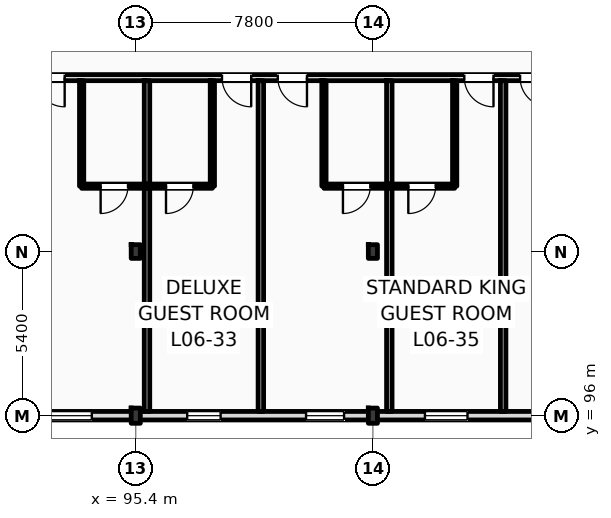
"""IFC4 building model, lengths in metres.
Left out: names, types, materials, properties, quantities, classifications, styles, units other than length and angle.
Written with IfcOpenShell. Run it as: python <this file> out.ifc"""

import sys

from ifc_helpers import new_model, si_unit, direction, frame, frame_2d, origin, origin_2d, place, context, subcontext, project, spatial, rectangle, i_section, extrude, element, fill, save


model = new_model("IFC4")
c1 = context("Model", 3, precision=1e-05, world=origin(), true_north=direction((0.0, 1.0)))
c2 = subcontext(c1, "Body", "Model", "MODEL_VIEW")
j1 = project(units=[si_unit("LENGTHUNIT", "METRE"), si_unit("PLANEANGLEUNIT", "RADIAN")], contexts=[c1])
p1 = place(None, origin())
s1 = spatial("IfcSite", under=j1, at=p1, CompositionType="ELEMENT")
p2 = place(p1, origin())
s2 = spatial("IfcBuilding", under=s1, at=p2, CompositionType="ELEMENT")
p3 = place(p2, frame((0.0, 0.0, 28.2)))
s3 = spatial("IfcBuildingStorey", under=s2, at=p3, CompositionType="ELEMENT", Elevation=28.2)
p4 = place(p3, frame((95.4, 96.0, 0.0), z_axis=(0.0, 0.0, 1.0), x_axis=(1.0, 0.0, 0.0)))
e1 = element("IfcColumn", 1, at=p4, inside=s3, PredefinedType="COLUMN", context=c2, shape_type="SweptSolid", body=[
    extrude(i_section(OverallWidth=0.3, OverallDepth=0.5, WebThickness=0.014, FlangeThickness=0.028, FilletRadius=0.027, at=origin_2d()), origin(), (0.0, 0.0, 1.0), 3.6),
])
p5 = place(p3, frame((95.4, 101.4, 0.0), z_axis=(0.0, 0.0, 1.0), x_axis=(1.0, 0.0, 0.0)))
e2 = element("IfcColumn", 2, at=p5, inside=s3, PredefinedType="COLUMN", context=c2, shape_type="SweptSolid", body=[
    extrude(i_section(OverallWidth=0.3, OverallDepth=0.45, WebThickness=0.014, FlangeThickness=0.026, FilletRadius=0.027, at=origin_2d()), origin(), (0.0, 0.0, 1.0), 3.6),
])
p6 = place(p3, frame((103.2, 96.0, 0.0), z_axis=(0.0, 0.0, 1.0), x_axis=(1.0, 0.0, 0.0)))
e3 = element("IfcColumn", 3, at=p6, inside=s3, PredefinedType="COLUMN", context=c2, shape_type="SweptSolid", body=[
    extrude(i_section(OverallWidth=0.3, OverallDepth=0.5, WebThickness=0.014, FlangeThickness=0.028, FilletRadius=0.027, at=origin_2d()), origin(), (0.0, 0.0, 1.0), 3.6),
])
p7 = place(p3, frame((103.2, 101.4, 0.0), z_axis=(0.0, 0.0, 1.0), x_axis=(1.0, 0.0, 0.0)))
e4 = element("IfcColumn", 4, at=p7, inside=s3, PredefinedType="COLUMN", context=c2, shape_type="SweptSolid", body=[
    extrude(i_section(OverallWidth=0.3, OverallDepth=0.45, WebThickness=0.014, FlangeThickness=0.026, FilletRadius=0.027, at=origin_2d()), origin(), (0.0, 0.0, 1.0), 3.6),
])
p8 = place(p3, frame((25.2, 96.0, 0.0), z_axis=(0.0, 0.0, 1.0), x_axis=(1.0, 0.0, 0.0)))
e5 = element("IfcWall", 5, at=p8, inside=s3, PredefinedType="STANDARD", context=c2, shape_type="SweptSolid", body=[
    extrude(rectangle(XDim=94.8, YDim=0.28, at=frame_2d((47.4, 0.0))), origin(), (0.0, 0.0, 1.0), 2.8),
])
p9 = place(p8, frame((16.454, 0.0, 0.9)))
e6 = element("IfcOpeningElement", 6, at=p9, cuts=e5, PredefinedType="OPENING", context=c2, shape_type="SweptSolid", body=[
    extrude(rectangle(XDim=2.7, YDim=1.72, at=frame_2d((1.35, 0.86))), frame((0.0, 0.15, 0.0), z_axis=(0.0, -1.0, 0.0), x_axis=(1.0, 0.0, 0.0)), (0.0, 0.0, 1.0), 0.3),
])
p10 = place(p8, frame((20.068, 0.0, 0.9)))
e7 = element("IfcOpeningElement", 7, at=p10, cuts=e5, PredefinedType="OPENING", context=c2, shape_type="SweptSolid", body=[
    extrude(rectangle(XDim=2.389, YDim=1.72, at=frame_2d((1.194, 0.86))), frame((0.0, 0.15, 0.0), z_axis=(0.0, -1.0, 0.0), x_axis=(1.0, 0.0, 0.0)), (0.0, 0.0, 1.0), 0.3),
])
p11 = place(p8, frame((24.277, 0.0, 0.9)))
e8 = element("IfcOpeningElement", 8, at=p11, cuts=e5, PredefinedType="OPENING", context=c2, shape_type="SweptSolid", body=[
    extrude(rectangle(XDim=1.8, YDim=1.72, at=frame_2d((0.9, 0.86))), frame((0.0, 0.15, 0.0), z_axis=(0.0, -1.0, 0.0), x_axis=(1.0, 0.0, 0.0)), (0.0, 0.0, 1.0), 0.3),
])
p12 = place(p8, frame((27.885, 0.0, 0.9)))
e9 = element("IfcOpeningElement", 9, at=p12, cuts=e5, PredefinedType="OPENING", context=c2, shape_type="SweptSolid", body=[
    extrude(rectangle(XDim=2.388, YDim=1.72, at=frame_2d((1.194, 0.86))), frame((0.0, 0.15, 0.0), z_axis=(0.0, -1.0, 0.0), x_axis=(1.0, 0.0, 0.0)), (0.0, 0.0, 1.0), 0.3),
])
p13 = place(p8, frame((32.093, 0.0, 0.9)))
e10 = element("IfcOpeningElement", 10, at=p13, cuts=e5, PredefinedType="OPENING", context=c2, shape_type="SweptSolid", body=[
    extrude(rectangle(XDim=1.8, YDim=1.72, at=frame_2d((0.9, 0.86))), frame((0.0, 0.15, 0.0), z_axis=(0.0, -1.0, 0.0), x_axis=(1.0, 0.0, 0.0)), (0.0, 0.0, 1.0), 0.3),
])
p14 = place(p8, frame((35.702, 0.0, 0.9)))
e11 = element("IfcOpeningElement", 11, at=p14, cuts=e5, PredefinedType="OPENING", context=c2, shape_type="SweptSolid", body=[
    extrude(rectangle(XDim=2.488, YDim=1.72, at=frame_2d((1.244, 0.86))), frame((0.0, 0.15, 0.0), z_axis=(0.0, -1.0, 0.0), x_axis=(1.0, 0.0, 0.0)), (0.0, 0.0, 1.0), 0.3),
])
p15 = place(p8, frame((55.56, 0.0, 0.9)))
e12 = element("IfcOpeningElement", 12, at=p15, cuts=e5, PredefinedType="OPENING", context=c2, shape_type="SweptSolid", body=[
    extrude(rectangle(XDim=1.8, YDim=1.72, at=frame_2d((0.9, 0.86))), frame((0.0, 0.15, 0.0), z_axis=(0.0, -1.0, 0.0), x_axis=(1.0, 0.0, 0.0)), (0.0, 0.0, 1.0), 0.3),
])
p16 = place(p8, frame((58.985, 0.0, 0.9)))
e13 = element("IfcOpeningElement", 13, at=p16, cuts=e5, PredefinedType="OPENING", context=c2, shape_type="SweptSolid", body=[
    extrude(rectangle(XDim=1.8, YDim=1.72, at=frame_2d((0.9, 0.86))), frame((0.0, 0.15, 0.0), z_axis=(0.0, -1.0, 0.0), x_axis=(1.0, 0.0, 0.0)), (0.0, 0.0, 1.0), 0.3),
])
p17 = place(p8, frame((63.21, 0.0, 0.9)))
e14 = element("IfcOpeningElement", 14, at=p17, cuts=e5, PredefinedType="OPENING", context=c2, shape_type="SweptSolid", body=[
    extrude(rectangle(XDim=2.525, YDim=1.72, at=frame_2d((1.262, 0.86))), frame((0.0, 0.15, 0.0), z_axis=(0.0, -1.0, 0.0), x_axis=(1.0, 0.0, 0.0)), (0.0, 0.0, 1.0), 0.3),
])
p18 = place(p8, frame((66.955, 0.0, 0.9)))
e15 = element("IfcOpeningElement", 15, at=p18, cuts=e5, PredefinedType="OPENING", context=c2, shape_type="SweptSolid", body=[
    extrude(rectangle(XDim=1.8, YDim=1.72, at=frame_2d((0.9, 0.86))), frame((0.0, 0.15, 0.0), z_axis=(0.0, -1.0, 0.0), x_axis=(1.0, 0.0, 0.0)), (0.0, 0.0, 1.0), 0.3),
])
p19 = place(p8, frame((71.892, 0.0, 0.9)))
e16 = element("IfcOpeningElement", 16, at=p19, cuts=e5, PredefinedType="OPENING", context=c2, shape_type="SweptSolid", body=[
    extrude(rectangle(XDim=1.1, YDim=1.5, at=frame_2d((0.55, 0.75))), frame((0.0, 0.15, 0.0), z_axis=(0.0, -1.0, 0.0), x_axis=(1.0, 0.0, 0.0)), (0.0, 0.0, 1.0), 0.3),
])
p20 = place(p8, frame((75.802, 0.0, 0.9)))
e17 = element("IfcOpeningElement", 17, at=p20, cuts=e5, PredefinedType="OPENING", context=c2, shape_type="SweptSolid", body=[
    extrude(rectangle(XDim=1.25, YDim=1.6, at=frame_2d((0.625, 0.8))), frame((0.0, 0.15, 0.0), z_axis=(0.0, -1.0, 0.0), x_axis=(1.0, 0.0, 0.0)), (0.0, 0.0, 1.0), 0.3),
])
p21 = place(p8, frame((79.712, 0.0, 0.9)))
e18 = element("IfcOpeningElement", 18, at=p21, cuts=e5, PredefinedType="OPENING", context=c2, shape_type="SweptSolid", body=[
    extrude(rectangle(XDim=1.4, YDim=1.7, at=frame_2d((0.7, 0.85))), frame((0.0, 0.15, 0.0), z_axis=(0.0, -1.0, 0.0), x_axis=(1.0, 0.0, 0.0)), (0.0, 0.0, 1.0), 0.3),
])
p22 = place(p8, frame((83.597, 0.0, 0.9)))
e19 = element("IfcOpeningElement", 19, at=p22, cuts=e5, PredefinedType="OPENING", context=c2, shape_type="SweptSolid", body=[
    extrude(rectangle(XDim=1.6, YDim=1.72, at=frame_2d((0.8, 0.86))), frame((0.0, 0.15, 0.0), z_axis=(0.0, -1.0, 0.0), x_axis=(1.0, 0.0, 0.0)), (0.0, 0.0, 1.0), 0.3),
])
p23 = place(p8, frame((87.507, 0.0, 0.9)))
e20 = element("IfcOpeningElement", 20, at=p23, cuts=e5, PredefinedType="OPENING", context=c2, shape_type="SweptSolid", body=[
    extrude(rectangle(XDim=1.75, YDim=1.72, at=frame_2d((0.875, 0.86))), frame((0.0, 0.15, 0.0), z_axis=(0.0, -1.0, 0.0), x_axis=(1.0, 0.0, 0.0)), (0.0, 0.0, 1.0), 0.3),
])
p24 = place(p8, frame((91.328, 0.0, 0.9)))
e21 = element("IfcOpeningElement", 21, at=p24, cuts=e5, PredefinedType="OPENING", context=c2, shape_type="SweptSolid", body=[
    extrude(rectangle(XDim=2.0, YDim=1.72, at=frame_2d((1.0, 0.86))), frame((0.0, 0.15, 0.0), z_axis=(0.0, -1.0, 0.0), x_axis=(1.0, 0.0, 0.0)), (0.0, 0.0, 1.0), 0.3),
])
p25 = place(p3, frame((79.76, 107.12, 0.0), z_axis=(0.0, 0.0, 1.0), x_axis=(1.0, 0.0, 0.0)))
e22 = element("IfcWall", 22, at=p25, inside=s3, PredefinedType="PARTITIONING", context=c2, shape_type="SweptSolid", body=[
    extrude(rectangle(XDim=40.1, YDim=0.2, at=frame_2d((20.05, 0.0))), origin(), (0.0, 0.0, 1.0), 3.36),
])
p26 = place(p25, frame((2.497, 0.0, 0.0)))
e23 = element("IfcOpeningElement", 23, at=p26, cuts=e22, PredefinedType="OPENING", context=c2, shape_type="SweptSolid", body=[
    extrude(rectangle(XDim=0.96, YDim=2.2, at=frame_2d((0.48, 1.1))), frame((0.0, 0.11, 0.0), z_axis=(0.0, -1.0, 0.0), x_axis=(1.0, 0.0, 0.0)), (0.0, 0.0, 1.0), 0.22),
])
p27 = place(p25, frame((4.372, 0.0, 0.0)))
e24 = element("IfcOpeningElement", 24, at=p27, cuts=e22, PredefinedType="OPENING", context=c2, shape_type="SweptSolid", body=[
    extrude(rectangle(XDim=0.96, YDim=2.2, at=frame_2d((0.48, 1.1))), frame((0.0, 0.11, 0.0), z_axis=(0.0, -1.0, 0.0), x_axis=(1.0, 0.0, 0.0)), (0.0, 0.0, 1.0), 0.22),
])
p28 = place(p25, frame((10.507, 0.0, 0.0)))
e25 = element("IfcOpeningElement", 25, at=p28, cuts=e22, PredefinedType="OPENING", context=c2, shape_type="SweptSolid", body=[
    extrude(rectangle(XDim=0.96, YDim=2.2, at=frame_2d((0.48, 1.1))), frame((0.0, 0.11, 0.0), z_axis=(0.0, -1.0, 0.0), x_axis=(1.0, 0.0, 0.0)), (0.0, 0.0, 1.0), 0.22),
])
p29 = place(p25, frame((12.342, 0.0, 0.0)))
e26 = element("IfcOpeningElement", 26, at=p29, cuts=e22, PredefinedType="OPENING", context=c2, shape_type="SweptSolid", body=[
    extrude(rectangle(XDim=0.96, YDim=2.2, at=frame_2d((0.48, 1.1))), frame((0.0, 0.11, 0.0), z_axis=(0.0, -1.0, 0.0), x_axis=(1.0, 0.0, 0.0)), (0.0, 0.0, 1.0), 0.22),
])
p30 = place(p25, frame((18.477, 0.0, 0.0)))
e27 = element("IfcOpeningElement", 27, at=p30, cuts=e22, PredefinedType="OPENING", context=c2, shape_type="SweptSolid", body=[
    extrude(rectangle(XDim=0.96, YDim=2.2, at=frame_2d((0.48, 1.1))), frame((0.0, 0.11, 0.0), z_axis=(0.0, -1.0, 0.0), x_axis=(1.0, 0.0, 0.0)), (0.0, 0.0, 1.0), 0.22),
])
p31 = place(p25, frame((20.312, 0.0, 0.0)))
e28 = element("IfcOpeningElement", 28, at=p31, cuts=e22, PredefinedType="OPENING", context=c2, shape_type="SweptSolid", body=[
    extrude(rectangle(XDim=0.96, YDim=2.2, at=frame_2d((0.48, 1.1))), frame((0.0, 0.11, 0.0), z_axis=(0.0, -1.0, 0.0), x_axis=(1.0, 0.0, 0.0)), (0.0, 0.0, 1.0), 0.22),
])
p32 = place(p25, frame((26.447, 0.0, 0.0)))
e29 = element("IfcOpeningElement", 29, at=p32, cuts=e22, PredefinedType="OPENING", context=c2, shape_type="SweptSolid", body=[
    extrude(rectangle(XDim=0.96, YDim=2.2, at=frame_2d((0.48, 1.1))), frame((0.0, 0.11, 0.0), z_axis=(0.0, -1.0, 0.0), x_axis=(1.0, 0.0, 0.0)), (0.0, 0.0, 1.0), 0.22),
])
p33 = place(p25, frame((28.282, 0.0, 0.0)))
e30 = element("IfcOpeningElement", 30, at=p33, cuts=e22, PredefinedType="OPENING", context=c2, shape_type="SweptSolid", body=[
    extrude(rectangle(XDim=0.96, YDim=2.2, at=frame_2d((0.48, 1.1))), frame((0.0, 0.11, 0.0), z_axis=(0.0, -1.0, 0.0), x_axis=(1.0, 0.0, 0.0)), (0.0, 0.0, 1.0), 0.22),
])
p34 = place(p25, frame((34.417, 0.0, 0.0)))
e31 = element("IfcOpeningElement", 31, at=p34, cuts=e22, PredefinedType="OPENING", context=c2, shape_type="SweptSolid", body=[
    extrude(rectangle(XDim=0.96, YDim=2.2, at=frame_2d((0.48, 1.1))), frame((0.0, 0.11, 0.0), z_axis=(0.0, -1.0, 0.0), x_axis=(1.0, 0.0, 0.0)), (0.0, 0.0, 1.0), 0.22),
])
p35 = place(p25, frame((36.212, 0.0, 0.0)))
e32 = element("IfcOpeningElement", 32, at=p35, cuts=e22, PredefinedType="OPENING", context=c2, shape_type="SweptSolid", body=[
    extrude(rectangle(XDim=0.96, YDim=2.2, at=frame_2d((0.48, 1.1))), frame((0.0, 0.11, 0.0), z_axis=(0.0, -1.0, 0.0), x_axis=(1.0, 0.0, 0.0)), (0.0, 0.0, 1.0), 0.22),
])
p36 = place(p3, frame((95.77, 96.14, 0.0), z_axis=(0.0, 0.0, 1.0), x_axis=(0.0, 1.0, 0.0)))
e33 = element("IfcWall", 33, at=p36, inside=s3, PredefinedType="PARTITIONING", context=c2, shape_type="SweptSolid", body=[
    extrude(rectangle(XDim=10.88, YDim=0.18, at=frame_2d((5.44, 0.0))), origin(), (0.0, 0.0, 1.0), 3.36),
])
p37 = place(p3, frame((93.62, 103.55, 0.0), z_axis=(0.0, 0.0, 1.0), x_axis=(0.0, 1.0, 0.0)))
e34 = element("IfcWall", 34, at=p37, inside=s3, PredefinedType="PARTITIONING", context=c2, shape_type="SweptSolid", body=[
    extrude(rectangle(XDim=3.47, YDim=0.14, at=frame_2d((1.735, 0.0))), origin(), (0.0, 0.0, 1.0), 3.36),
])
p38 = place(p3, frame((93.62, 103.55, 0.0), z_axis=(0.0, 0.0, 1.0), x_axis=(1.0, 0.0, 0.0)))
e35 = element("IfcWall", 35, at=p38, inside=s3, PredefinedType="PARTITIONING", context=c2, shape_type="SweptSolid", body=[
    extrude(rectangle(XDim=2.15, YDim=0.14, at=frame_2d((1.075, 0.0))), origin(), (0.0, 0.0, 1.0), 3.36),
])
p39 = place(p38, frame((0.625, 0.0, 0.0)))
e36 = element("IfcOpeningElement", 36, at=p39, cuts=e35, PredefinedType="OPENING", context=c2, shape_type="SweptSolid", body=[
    extrude(rectangle(XDim=0.9, YDim=2.1, at=frame_2d((0.45, 1.05))), frame((0.0, 0.08, 0.0), z_axis=(0.0, -1.0, 0.0), x_axis=(1.0, 0.0, 0.0)), (0.0, 0.0, 1.0), 0.16),
])
p40 = place(p3, frame((99.515, 96.14, 0.0), z_axis=(0.0, 0.0, 1.0), x_axis=(0.0, 1.0, 0.0)))
e37 = element("IfcWall", 37, at=p40, inside=s3, PredefinedType="PARTITIONING", context=c2, shape_type="SweptSolid", body=[
    extrude(rectangle(XDim=10.88, YDim=0.18, at=frame_2d((5.44, 0.0))), origin(), (0.0, 0.0, 1.0), 3.36),
])
p41 = place(p3, frame((97.92, 103.55, 0.0), z_axis=(0.0, 0.0, 1.0), x_axis=(0.0, 1.0, 0.0)))
e38 = element("IfcWall", 38, at=p41, inside=s3, PredefinedType="PARTITIONING", context=c2, shape_type="SweptSolid", body=[
    extrude(rectangle(XDim=3.47, YDim=0.14, at=frame_2d((1.735, 0.0))), origin(), (0.0, 0.0, 1.0), 3.05),
])
p42 = place(p3, frame((95.77, 103.55, 0.0), z_axis=(0.0, 0.0, 1.0), x_axis=(1.0, 0.0, 0.0)))
e39 = element("IfcWall", 39, at=p42, inside=s3, PredefinedType="PARTITIONING", context=c2, shape_type="SweptSolid", body=[
    extrude(rectangle(XDim=2.15, YDim=0.14, at=frame_2d((1.075, 0.0))), origin(), (0.0, 0.0, 1.0), 3.36),
])
p43 = place(p42, frame((0.625, 0.0, 0.0)))
e40 = element("IfcOpeningElement", 40, at=p43, cuts=e39, PredefinedType="OPENING", context=c2, shape_type="SweptSolid", body=[
    extrude(rectangle(XDim=0.9, YDim=2.1, at=frame_2d((0.45, 1.05))), frame((0.0, 0.08, 0.0), z_axis=(0.0, -1.0, 0.0), x_axis=(1.0, 0.0, 0.0)), (0.0, 0.0, 1.0), 0.16),
])
p44 = place(p3, frame((103.74, 96.14, 0.0), z_axis=(0.0, 0.0, 1.0), x_axis=(0.0, 1.0, 0.0)))
e41 = element("IfcWall", 41, at=p44, inside=s3, PredefinedType="PARTITIONING", context=c2, shape_type="SweptSolid", body=[
    extrude(rectangle(XDim=10.88, YDim=0.18, at=frame_2d((5.44, 0.0))), origin(), (0.0, 0.0, 1.0), 3.36),
])
p45 = place(p3, frame((101.59, 103.55, 0.0), z_axis=(0.0, 0.0, 1.0), x_axis=(0.0, 1.0, 0.0)))
e42 = element("IfcWall", 42, at=p45, inside=s3, PredefinedType="PARTITIONING", context=c2, shape_type="SweptSolid", body=[
    extrude(rectangle(XDim=3.47, YDim=0.14, at=frame_2d((1.735, 0.0))), origin(), (0.0, 0.0, 1.0), 3.36),
])
p46 = place(p3, frame((101.59, 103.55, 0.0), z_axis=(0.0, 0.0, 1.0), x_axis=(1.0, 0.0, 0.0)))
e43 = element("IfcWall", 43, at=p46, inside=s3, PredefinedType="PARTITIONING", context=c2, shape_type="SweptSolid", body=[
    extrude(rectangle(XDim=2.15, YDim=0.14, at=frame_2d((1.075, 0.0))), origin(), (0.0, 0.0, 1.0), 3.36),
])
p47 = place(p46, frame((0.625, 0.0, 0.0)))
e44 = element("IfcOpeningElement", 44, at=p47, cuts=e43, PredefinedType="OPENING", context=c2, shape_type="SweptSolid", body=[
    extrude(rectangle(XDim=0.9, YDim=2.1, at=frame_2d((0.45, 1.05))), frame((0.0, 0.08, 0.0), z_axis=(0.0, -1.0, 0.0), x_axis=(1.0, 0.0, 0.0)), (0.0, 0.0, 1.0), 0.16),
])
p48 = place(p3, frame((107.485, 96.14, 0.0), z_axis=(0.0, 0.0, 1.0), x_axis=(0.0, 1.0, 0.0)))
e45 = element("IfcWall", 45, at=p48, inside=s3, PredefinedType="PARTITIONING", context=c2, shape_type="SweptSolid", body=[
    extrude(rectangle(XDim=10.88, YDim=0.18, at=frame_2d((5.44, 0.0))), origin(), (0.0, 0.0, 1.0), 3.36),
])
p49 = place(p3, frame((105.89, 103.55, 0.0), z_axis=(0.0, 0.0, 1.0), x_axis=(0.0, 1.0, 0.0)))
e46 = element("IfcWall", 46, at=p49, inside=s3, PredefinedType="PARTITIONING", context=c2, shape_type="SweptSolid", body=[
    extrude(rectangle(XDim=3.47, YDim=0.14, at=frame_2d((1.735, 0.0))), origin(), (0.0, 0.0, 1.0), 3.05),
])
p50 = place(p3, frame((103.74, 103.55, 0.0), z_axis=(0.0, 0.0, 1.0), x_axis=(1.0, 0.0, 0.0)))
e47 = element("IfcWall", 47, at=p50, inside=s3, PredefinedType="PARTITIONING", context=c2, shape_type="SweptSolid", body=[
    extrude(rectangle(XDim=2.15, YDim=0.14, at=frame_2d((1.075, 0.0))), origin(), (0.0, 0.0, 1.0), 3.36),
])
p51 = place(p50, frame((0.625, 0.0, 0.0)))
e48 = element("IfcOpeningElement", 48, at=p51, cuts=e47, PredefinedType="OPENING", context=c2, shape_type="SweptSolid", body=[
    extrude(rectangle(XDim=0.9, YDim=2.1, at=frame_2d((0.45, 1.05))), frame((0.0, 0.08, 0.0), z_axis=(0.0, -1.0, 0.0), x_axis=(1.0, 0.0, 0.0)), (0.0, 0.0, 1.0), 0.16),
])
p52 = place(p18, origin())
e49 = element("IfcWindow", 49, at=p52, inside=s3, PartitioningType="DOUBLE_PANEL_VERTICAL", PredefinedType="WINDOW", context=c2, shape_type="SweptSolid", body=[
    extrude(rectangle(XDim=1.8, YDim=1.72, at=frame_2d((0.9, 0.86))), frame((0.0, 0.03, 0.0), z_axis=(0.0, -1.0, 0.0), x_axis=(1.0, 0.0, 0.0)), (0.0, 0.0, 1.0), 0.06),
])
fill(e15, e49)
p53 = place(p19, origin())
e50 = element("IfcWindow", 50, at=p53, inside=s3, PartitioningType="DOUBLE_PANEL_VERTICAL", PredefinedType="WINDOW", context=c2, shape_type="SweptSolid", body=[
    extrude(rectangle(XDim=1.1, YDim=1.5, at=frame_2d((0.55, 0.75))), frame((0.0, 0.03, 0.0), z_axis=(0.0, -1.0, 0.0), x_axis=(1.0, 0.0, 0.0)), (0.0, 0.0, 1.0), 0.06),
])
fill(e16, e50)
p54 = place(p20, origin())
e51 = element("IfcWindow", 51, at=p54, inside=s3, PartitioningType="DOUBLE_PANEL_VERTICAL", PredefinedType="WINDOW", context=c2, shape_type="SweptSolid", body=[
    extrude(rectangle(XDim=1.25, YDim=1.6, at=frame_2d((0.625, 0.8))), frame((0.0, 0.03, 0.0), z_axis=(0.0, -1.0, 0.0), x_axis=(1.0, 0.0, 0.0)), (0.0, 0.0, 1.0), 0.06),
])
fill(e17, e51)
p55 = place(p21, origin())
e52 = element("IfcWindow", 52, at=p55, inside=s3, PartitioningType="DOUBLE_PANEL_VERTICAL", PredefinedType="WINDOW", context=c2, shape_type="SweptSolid", body=[
    extrude(rectangle(XDim=1.4, YDim=1.7, at=frame_2d((0.7, 0.85))), frame((0.0, 0.03, 0.0), z_axis=(0.0, -1.0, 0.0), x_axis=(1.0, 0.0, 0.0)), (0.0, 0.0, 1.0), 0.06),
])
fill(e18, e52)
p56 = place(p29, frame((0.96, 0.0, 0.0), z_axis=(0.0, 0.0, 1.0), x_axis=(-1.0, 0.0, 0.0)))
e53 = element("IfcDoor", 53, at=p56, inside=s3, OperationType="SINGLE_SWING_RIGHT", PredefinedType="DOOR", context=c2, shape_type="SweptSolid", body=[
    extrude(rectangle(XDim=0.96, YDim=2.2, at=frame_2d((0.48, 1.1))), frame((0.0, 0.025, 0.0), z_axis=(0.0, -1.0, 0.0), x_axis=(1.0, 0.0, 0.0)), (0.0, 0.0, 1.0), 0.05),
])
fill(e26, e53)
p57 = place(p39, frame((0.9, 0.0, 0.0), z_axis=(0.0, 0.0, 1.0), x_axis=(-1.0, 0.0, 0.0)))
e54 = element("IfcDoor", 54, at=p57, inside=s3, OperationType="SINGLE_SWING_LEFT", PredefinedType="DOOR", context=c2, shape_type="SweptSolid", body=[
    extrude(rectangle(XDim=0.9, YDim=2.1, at=frame_2d((0.45, 1.05))), frame((0.0, 0.025, 0.0), z_axis=(0.0, -1.0, 0.0), x_axis=(1.0, 0.0, 0.0)), (0.0, 0.0, 1.0), 0.05),
])
fill(e36, e54)
p58 = place(p30, frame((0.96, 0.0, 0.0), z_axis=(0.0, 0.0, 1.0), x_axis=(-1.0, 0.0, 0.0)))
e55 = element("IfcDoor", 55, at=p58, inside=s3, OperationType="SINGLE_SWING_RIGHT", PredefinedType="DOOR", context=c2, shape_type="SweptSolid", body=[
    extrude(rectangle(XDim=0.96, YDim=2.2, at=frame_2d((0.48, 1.1))), frame((0.0, 0.025, 0.0), z_axis=(0.0, -1.0, 0.0), x_axis=(1.0, 0.0, 0.0)), (0.0, 0.0, 1.0), 0.05),
])
fill(e27, e55)
p59 = place(p43, frame((0.9, 0.0, 0.0), z_axis=(0.0, 0.0, 1.0), x_axis=(-1.0, 0.0, 0.0)))
e56 = element("IfcDoor", 56, at=p59, inside=s3, OperationType="SINGLE_SWING_LEFT", PredefinedType="DOOR", context=c2, shape_type="SweptSolid", body=[
    extrude(rectangle(XDim=0.9, YDim=2.1, at=frame_2d((0.45, 1.05))), frame((0.0, 0.025, 0.0), z_axis=(0.0, -1.0, 0.0), x_axis=(1.0, 0.0, 0.0)), (0.0, 0.0, 1.0), 0.05),
])
fill(e40, e56)
p60 = place(p31, frame((0.96, 0.0, 0.0), z_axis=(0.0, 0.0, 1.0), x_axis=(-1.0, 0.0, 0.0)))
e57 = element("IfcDoor", 57, at=p60, inside=s3, OperationType="SINGLE_SWING_RIGHT", PredefinedType="DOOR", context=c2, shape_type="SweptSolid", body=[
    extrude(rectangle(XDim=0.96, YDim=2.2, at=frame_2d((0.48, 1.1))), frame((0.0, 0.025, 0.0), z_axis=(0.0, -1.0, 0.0), x_axis=(1.0, 0.0, 0.0)), (0.0, 0.0, 1.0), 0.05),
])
fill(e28, e57)
p61 = place(p47, frame((0.9, 0.0, 0.0), z_axis=(0.0, 0.0, 1.0), x_axis=(-1.0, 0.0, 0.0)))
e58 = element("IfcDoor", 58, at=p61, inside=s3, OperationType="SINGLE_SWING_LEFT", PredefinedType="DOOR", context=c2, shape_type="SweptSolid", body=[
    extrude(rectangle(XDim=0.9, YDim=2.1, at=frame_2d((0.45, 1.05))), frame((0.0, 0.025, 0.0), z_axis=(0.0, -1.0, 0.0), x_axis=(1.0, 0.0, 0.0)), (0.0, 0.0, 1.0), 0.05),
])
fill(e44, e58)
p62 = place(p32, frame((0.96, 0.0, 0.0), z_axis=(0.0, 0.0, 1.0), x_axis=(-1.0, 0.0, 0.0)))
e59 = element("IfcDoor", 59, at=p62, inside=s3, OperationType="SINGLE_SWING_RIGHT", PredefinedType="DOOR", context=c2, shape_type="SweptSolid", body=[
    extrude(rectangle(XDim=0.96, YDim=2.2, at=frame_2d((0.48, 1.1))), frame((0.0, 0.025, 0.0), z_axis=(0.0, -1.0, 0.0), x_axis=(1.0, 0.0, 0.0)), (0.0, 0.0, 1.0), 0.05),
])
fill(e29, e59)
p63 = place(p51, frame((0.9, 0.0, 0.0), z_axis=(0.0, 0.0, 1.0), x_axis=(-1.0, 0.0, 0.0)))
e60 = element("IfcDoor", 60, at=p63, inside=s3, OperationType="SINGLE_SWING_LEFT", PredefinedType="DOOR", context=c2, shape_type="SweptSolid", body=[
    extrude(rectangle(XDim=0.9, YDim=2.1, at=frame_2d((0.45, 1.05))), frame((0.0, 0.025, 0.0), z_axis=(0.0, -1.0, 0.0), x_axis=(1.0, 0.0, 0.0)), (0.0, 0.0, 1.0), 0.05),
])
fill(e48, e60)
p64 = place(p33, frame((0.96, 0.0, 0.0), z_axis=(0.0, 0.0, 1.0), x_axis=(-1.0, 0.0, 0.0)))
e61 = element("IfcDoor", 61, at=p64, inside=s3, OperationType="SINGLE_SWING_RIGHT", PredefinedType="DOOR", context=c2, shape_type="SweptSolid", body=[
    extrude(rectangle(XDim=0.96, YDim=2.2, at=frame_2d((0.48, 1.1))), frame((0.0, 0.025, 0.0), z_axis=(0.0, -1.0, 0.0), x_axis=(1.0, 0.0, 0.0)), (0.0, 0.0, 1.0), 0.05),
])
fill(e30, e61)
save(model, sys.argv[1])
